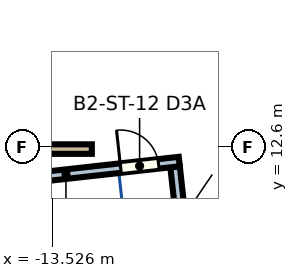
"""IFC4 building model, lengths in metres.
Left out: names, types, materials, properties, quantities, classifications, styles, units other than length and angle.
Written with IfcOpenShell. Run it as: python <this file> out.ifc"""

import sys

from ifc_helpers import new_model, si_unit, direction, frame, frame_2d, origin, place, context, subcontext, project, spatial, rectangle, extrude, element, fill, save


model = new_model("IFC4")
c1 = context("Model", 3, precision=1e-05, world=origin(), true_north=direction((0.0, 1.0)))
c2 = subcontext(c1, "Body", "Model", "MODEL_VIEW")
j1 = project(units=[si_unit("LENGTHUNIT", "METRE"), si_unit("PLANEANGLEUNIT", "RADIAN")], contexts=[c1])
p1 = place(None, origin())
s1 = spatial("IfcSite", under=j1, at=p1, CompositionType="ELEMENT")
p2 = place(p1, origin())
s2 = spatial("IfcBuilding", under=s1, at=p2, CompositionType="ELEMENT")
p3 = place(p2, frame((0.0, 0.0, -9.0)))
s3 = spatial("IfcBuildingStorey", under=s2, at=p3, CompositionType="ELEMENT", Elevation=-9.0)
p4 = place(p3, frame((-16.05, 12.6, 0.0), z_axis=(0.0, 0.0, 1.0), x_axis=(1.0, 0.0, 0.0)))
e1 = element("IfcWall", 1, at=p4, inside=s3, PredefinedType="PARTITIONING", context=c2, shape_type="SweptSolid", body=[
    extrude(rectangle(XDim=3.561, YDim=0.25, at=frame_2d((1.78, 0.0))), origin(), (0.0, 0.0, 1.0), 3.7),
])
p5 = place(p3, frame((-10.3, 12.134, 0.0), z_axis=(0.0, 0.0, 1.0), x_axis=(0.110328108544, -0.993895220063, 0.0)))
e2 = element("IfcWall", 2, at=p5, inside=s3, PredefinedType="SOLIDWALL", context=c2, shape_type="SweptSolid", body=[
    extrude(rectangle(XDim=2.85, YDim=0.25, at=frame_2d((1.425, 0.0))), origin(), (0.0, 0.0, 1.0), 3.7),
])
p6 = place(p3, frame((-16.153, 11.61, 0.0), z_axis=(0.0, 0.0, 1.0), x_axis=(0.993897125329, 0.110310943534, 0.0)))
e3 = element("IfcWall", 3, at=p6, inside=s3, PredefinedType="SOLIDWALL", context=c2, shape_type="SweptSolid", body=[
    extrude(rectangle(XDim=6.0, YDim=0.25, at=frame_2d((3.0, 0.0))), origin(), (0.0, 0.0, 1.0), 3.7),
])
p7 = place(p6, frame((4.45, 0.0, 0.0)))
e4 = element("IfcOpeningElement", 4, at=p7, cuts=e3, PredefinedType="OPENING", context=c2, shape_type="SweptSolid", body=[
    extrude(rectangle(XDim=1.0, YDim=2.1, at=frame_2d((0.5, 1.05))), frame((0.0, 0.135, 0.0), z_axis=(0.0, -1.0, 0.0), x_axis=(1.0, 0.0, 0.0)), (0.0, 0.0, 1.0), 0.27),
])
p8 = place(p7, origin())
e5 = element("IfcDoor", 5, at=p8, inside=s3, PredefinedType="DOOR", context=c2, shape_type="SweptSolid", body=[
    extrude(rectangle(XDim=1.0, YDim=2.1, at=frame_2d((0.5, 1.05))), frame((0.0, 0.025, 0.0), z_axis=(0.0, -1.0, 0.0), x_axis=(1.0, 0.0, 0.0)), (0.0, 0.0, 1.0), 0.05),
])
fill(e4, e5)
save(model, sys.argv[1])
